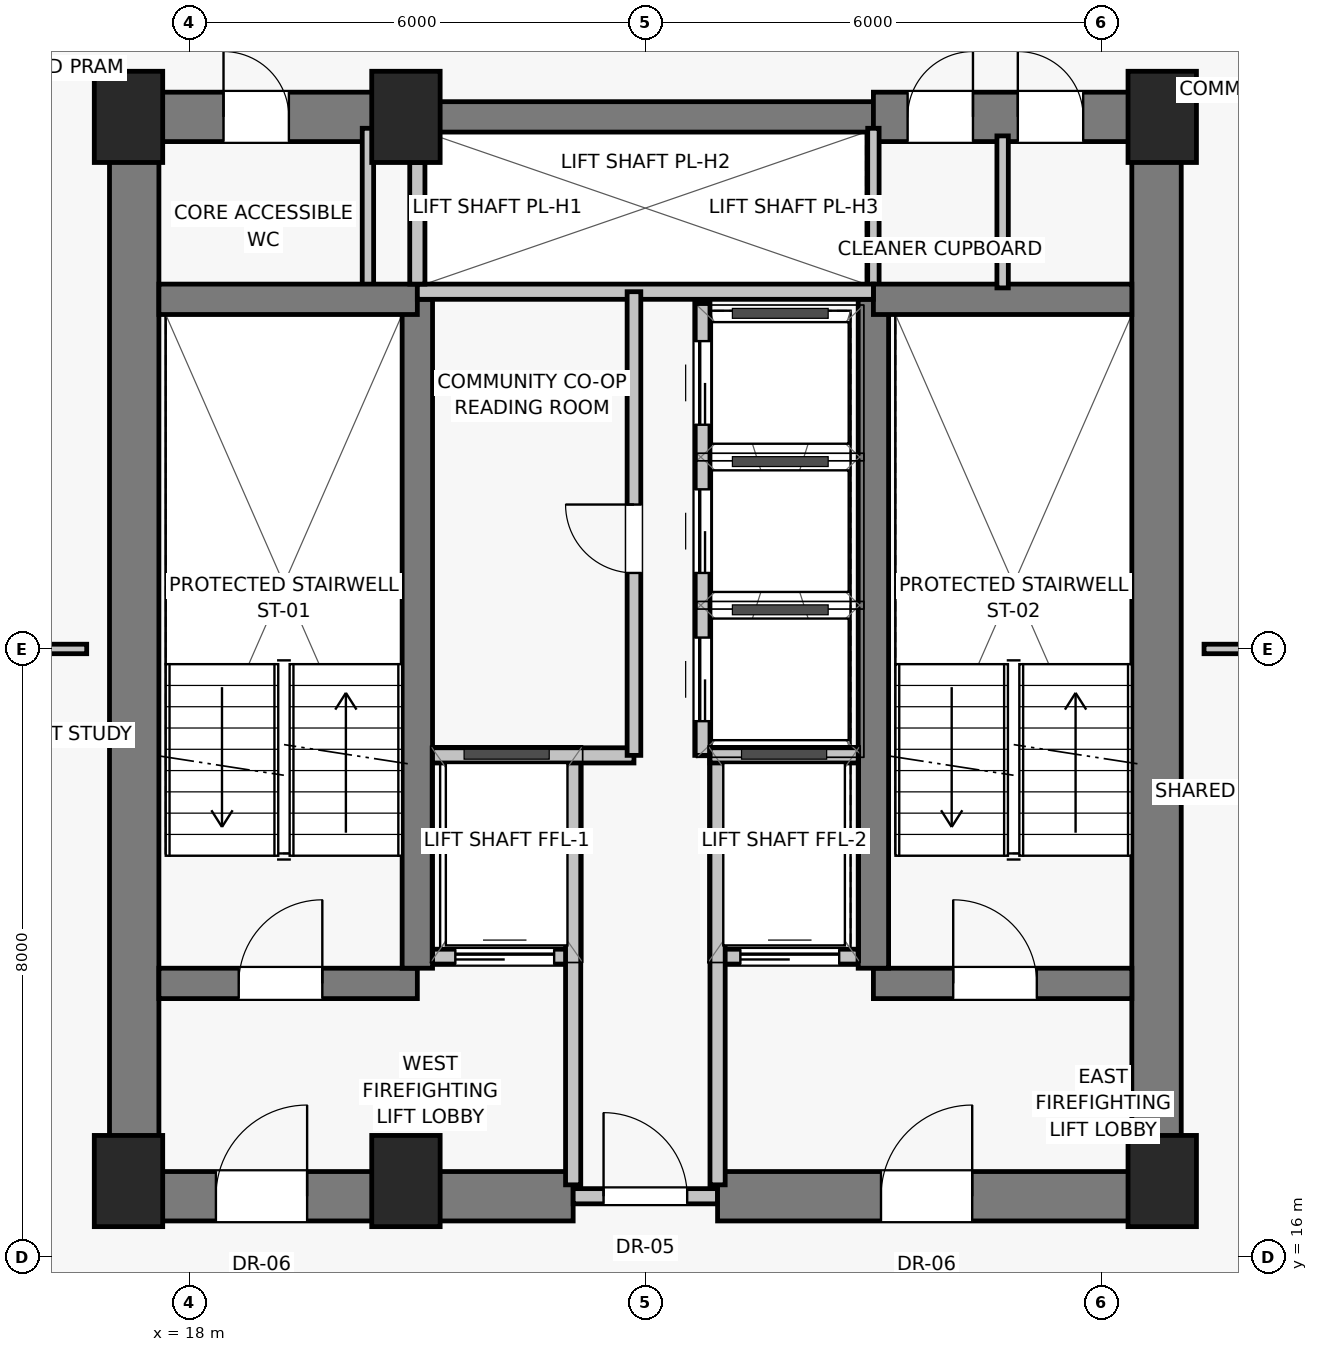
"""IFC4 building model, lengths in metres.
Left out: names, types, materials, properties, quantities, classifications, styles, units other than length and angle.
Written with IfcOpenShell. Run it as: python <this file> out.ifc"""

import sys

from ifc_helpers import new_model, si_unit, direction, frame, frame_2d, origin, origin_2d, place, context, subcontext, project, spatial, rectangle, extrude, source, transform, mapped, element, fill, save


model = new_model("IFC4")
c1 = context("Model", 3, precision=1e-05, world=origin(), true_north=direction((0.0, 1.0)))
c2 = subcontext(c1, "Body", "Model", "MODEL_VIEW")
j1 = project(units=[si_unit("LENGTHUNIT", "METRE"), si_unit("PLANEANGLEUNIT", "RADIAN")], contexts=[c1])
p1 = place(None, origin())
s1 = spatial("IfcSite", under=j1, at=p1, CompositionType="ELEMENT")
p2 = place(p1, origin())
s2 = spatial("IfcBuilding", under=s1, at=p2, CompositionType="ELEMENT")
p3 = place(p2, frame((0.0, 0.0, 139.25)))
s3 = spatial("IfcBuildingStorey", under=s2, at=p3, CompositionType="ELEMENT", Elevation=139.25)
for number, where, z_axis, x_axis in (
    (1, (17.2, 17.0, 0.0), (0.0, 0.0, 1.0), (1.0, 0.0, 0.0)),
    (2, (20.85, 17.0, 0.0), (0.0, 0.0, 1.0), (1.0, 0.0, 0.0)),
    (3, (30.8, 17.0, 0.0), (0.0, 0.0, 1.0), (1.0, 0.0, 0.0)),
    (4, (17.2, 31.0, 0.0), (0.0, 0.0, 1.0), (1.0, 0.0, 0.0)),
    (5, (20.85, 31.0, 0.0), (0.0, 0.0, 1.0), (1.0, 0.0, 0.0)),
    (6, (30.8, 31.0, 0.0), (0.0, 0.0, 1.0), (1.0, 0.0, 0.0)),
):
    element("IfcColumn", number, at=place(p3, frame(where, z_axis=z_axis, x_axis=x_axis)), inside=s3, PredefinedType="PILASTER", context=c2, shape_type="SweptSolid", body=[
        extrude(rectangle(XDim=0.9, YDim=1.2, at=origin_2d()), origin(), (0.0, 0.0, 1.0), 3.25),
    ])
for number, where, z_axis, x_axis in (
    (7, (17.275, 16.8, 0.0), (0.0, 0.0, 1.0), (0.0, 1.0, 0.0)),
    (8, (30.725, 16.8, 0.0), (0.0, 0.0, 1.0), (0.0, 1.0, 0.0)),
):
    element("IfcWall", number, at=place(p3, frame(where, z_axis=z_axis, x_axis=x_axis)), inside=s3, PredefinedType="SHEAR", context=c2, shape_type="SweptSolid", body=[
        extrude(rectangle(XDim=14.2, YDim=0.65, at=frame_2d((7.1, 0.0))), origin(), (0.0, 0.0, 1.0), 3.0),
    ])
p4 = place(p3, frame((17.2, 16.8, 0.0), z_axis=(0.0, 0.0, 1.0), x_axis=(1.0, 0.0, 0.0)))
e9 = element("IfcWall", 9, at=p4, inside=s3, PredefinedType="SHEAR", context=c2, shape_type="SweptSolid", body=[
    extrude(rectangle(XDim=5.85, YDim=0.65, at=frame_2d((2.925, 0.0))), origin(), (0.0, 0.0, 1.0), 3.0),
])
p5 = place(p4, frame((1.15, 0.0, 0.0)))
e10 = element("IfcOpeningElement", 10, at=p5, cuts=e9, PredefinedType="OPENING", context=c2, shape_type="SweptSolid", body=[
    extrude(rectangle(XDim=1.2, YDim=2.03, at=frame_2d((0.6, 1.015))), frame((0.0, 0.335, 0.0), z_axis=(0.0, -1.0, 0.0), x_axis=(1.0, 0.0, 0.0)), (0.0, 0.0, 1.0), 0.67),
])
p6 = place(p3, frame((23.05, 16.8, 0.0), z_axis=(0.0, 0.0, 1.0), x_axis=(1.0, 0.0, 0.0)))
e11 = element("IfcWall", 11, at=p6, inside=s3, PredefinedType="SOLIDWALL", context=c2, shape_type="SweptSolid", body=[
    extrude(rectangle(XDim=1.9, YDim=0.2, at=frame_2d((0.95, 0.0))), origin(), (0.0, 0.0, 1.0), 2.15),
])
p7 = place(p6, frame((0.4, 0.0, 0.0)))
e12 = element("IfcOpeningElement", 12, at=p7, cuts=e11, PredefinedType="OPENING", context=c2, shape_type="SweptSolid", body=[
    extrude(rectangle(XDim=1.1, YDim=2.03, at=frame_2d((0.55, 1.015))), frame((0.0, 0.11, 0.0), z_axis=(0.0, -1.0, 0.0), x_axis=(1.0, 0.0, 0.0)), (0.0, 0.0, 1.0), 0.22),
])
p8 = place(p3, frame((24.95, 16.8, 0.0), z_axis=(0.0, 0.0, 1.0), x_axis=(1.0, 0.0, 0.0)))
e13 = element("IfcWall", 13, at=p8, inside=s3, PredefinedType="SHEAR", context=c2, shape_type="SweptSolid", body=[
    extrude(rectangle(XDim=5.85, YDim=0.65, at=frame_2d((2.925, 0.0))), origin(), (0.0, 0.0, 1.0), 3.0),
])
p9 = place(p8, frame((2.15, 0.0, 0.0)))
e14 = element("IfcOpeningElement", 14, at=p9, cuts=e13, PredefinedType="OPENING", context=c2, shape_type="SweptSolid", body=[
    extrude(rectangle(XDim=1.2, YDim=2.03, at=frame_2d((0.6, 1.015))), frame((0.0, 0.335, 0.0), z_axis=(0.0, -1.0, 0.0), x_axis=(1.0, 0.0, 0.0)), (0.0, 0.0, 1.0), 0.67),
])
p10 = place(p3, frame((17.2, 31.0, 0.0), z_axis=(0.0, 0.0, 1.0), x_axis=(1.0, 0.0, 0.0)))
e15 = element("IfcWall", 15, at=p10, inside=s3, PredefinedType="SHEAR", context=c2, shape_type="SweptSolid", body=[
    extrude(rectangle(XDim=3.8, YDim=0.65, at=frame_2d((1.9, 0.0))), origin(), (0.0, 0.0, 1.0), 3.0),
])
p11 = place(p10, frame((1.25, 0.0, 0.0)))
e16 = element("IfcOpeningElement", 16, at=p11, cuts=e15, PredefinedType="OPENING", context=c2, shape_type="SweptSolid", body=[
    extrude(rectangle(XDim=0.86, YDim=2.01, at=frame_2d((0.43, 1.005))), frame((0.0, 0.335, 0.0), z_axis=(0.0, -1.0, 0.0), x_axis=(1.0, 0.0, 0.0)), (0.0, 0.0, 1.0), 0.67),
])
p12 = place(p3, frame((21.0, 31.0, 0.0), z_axis=(0.0, 0.0, 1.0), x_axis=(1.0, 0.0, 0.0)))
e17 = element("IfcWall", 17, at=p12, inside=s3, PredefinedType="SHEAR", context=c2, shape_type="SweptSolid", body=[
    extrude(rectangle(XDim=6.0, YDim=0.4, at=frame_2d((3.0, 0.0))), origin(), (0.0, 0.0, 1.0), 3.0),
])
p13 = place(p3, frame((27.0, 31.0, 0.0), z_axis=(0.0, 0.0, 1.0), x_axis=(1.0, 0.0, 0.0)))
e18 = element("IfcWall", 18, at=p13, inside=s3, PredefinedType="SHEAR", context=c2, shape_type="SweptSolid", body=[
    extrude(rectangle(XDim=3.8, YDim=0.65, at=frame_2d((1.9, 0.0))), origin(), (0.0, 0.0, 1.0), 3.0),
])
p14 = place(p13, frame((0.45, 0.0, 0.0)))
e19 = element("IfcOpeningElement", 19, at=p14, cuts=e18, PredefinedType="OPENING", context=c2, shape_type="SweptSolid", body=[
    extrude(rectangle(XDim=0.86, YDim=2.01, at=frame_2d((0.43, 1.005))), frame((0.0, 0.335, 0.0), z_axis=(0.0, -1.0, 0.0), x_axis=(1.0, 0.0, 0.0)), (0.0, 0.0, 1.0), 0.67),
])
p15 = place(p13, frame((1.9, 0.0, 0.0)))
e20 = element("IfcOpeningElement", 20, at=p15, cuts=e18, PredefinedType="OPENING", context=c2, shape_type="SweptSolid", body=[
    extrude(rectangle(XDim=0.86, YDim=2.01, at=frame_2d((0.43, 1.005))), frame((0.0, 0.335, 0.0), z_axis=(0.0, -1.0, 0.0), x_axis=(1.0, 0.0, 0.0)), (0.0, 0.0, 1.0), 0.67),
])
for number, where, z_axis, x_axis in (
    (21, (20.35, 28.65, 0.0), (0.0, 0.0, 1.0), (0.0, 1.0, 0.0)),
    (22, (27.0, 28.65, 0.0), (0.0, 0.0, 1.0), (0.0, 1.0, 0.0)),
):
    element("IfcWall", number, at=place(p3, frame(where, z_axis=z_axis, x_axis=x_axis)), inside=s3, PredefinedType="PARTITIONING", context=c2, shape_type="SweptSolid", body=[
        extrude(rectangle(XDim=2.2, YDim=0.15, at=frame_2d((1.1, 0.0))), origin(), (0.0, 0.0, 1.0), 3.0),
    ])
p16 = place(p3, frame((17.6, 19.6, 0.0), z_axis=(0.0, 0.0, 1.0), x_axis=(1.0, 0.0, 0.0)))
e23 = element("IfcWall", 23, at=p16, inside=s3, PredefinedType="SHEAR", context=c2, shape_type="SweptSolid", body=[
    extrude(rectangle(XDim=3.4, YDim=0.4, at=frame_2d((1.7, 0.0))), origin(), (0.0, 0.0, 1.0), 3.0),
])
p17 = place(p16, frame((1.05, 0.0, 0.0)))
e24 = element("IfcOpeningElement", 24, at=p17, cuts=e23, PredefinedType="OPENING", context=c2, shape_type="SweptSolid", body=[
    extrude(rectangle(XDim=1.1, YDim=2.03, at=frame_2d((0.55, 1.015))), frame((0.0, 0.21, 0.0), z_axis=(0.0, -1.0, 0.0), x_axis=(1.0, 0.0, 0.0)), (0.0, 0.0, 1.0), 0.42),
])
p18 = place(p3, frame((21.2, 19.95, 0.0), z_axis=(0.0, 0.0, 1.0), x_axis=(1.0, 0.0, 0.0)))
e25 = element("IfcWall", 25, at=p18, inside=s3, PredefinedType="SOLIDWALL", context=c2, shape_type="SweptSolid", body=[
    extrude(rectangle(XDim=1.85, YDim=0.2, at=frame_2d((0.925, 0.0))), origin(), (0.0, 0.0, 1.0), 3.0),
])
p19 = place(p18, frame((0.3, 0.0, 0.0)))
e26 = element("IfcOpeningElement", 26, at=p19, cuts=e25, PredefinedType="OPENING", context=c2, shape_type="SweptSolid", body=[
    extrude(rectangle(XDim=1.3, YDim=2.25, at=frame_2d((0.65, 1.125))), frame((0.0, 0.11, 0.0), z_axis=(0.0, -1.0, 0.0), x_axis=(1.0, 0.0, 0.0)), (0.0, 0.0, 1.0), 0.22),
])
p20 = place(p3, frame((24.95, 19.95, 0.0), z_axis=(0.0, 0.0, 1.0), x_axis=(1.0, 0.0, 0.0)))
e27 = element("IfcWall", 27, at=p20, inside=s3, PredefinedType="SOLIDWALL", context=c2, shape_type="SweptSolid", body=[
    extrude(rectangle(XDim=1.85, YDim=0.2, at=frame_2d((0.925, 0.0))), origin(), (0.0, 0.0, 1.0), 3.0),
])
p21 = place(p20, frame((0.3, 0.0, 0.0)))
e28 = element("IfcOpeningElement", 28, at=p21, cuts=e27, PredefinedType="OPENING", context=c2, shape_type="SweptSolid", body=[
    extrude(rectangle(XDim=1.3, YDim=2.25, at=frame_2d((0.65, 1.125))), frame((0.0, 0.11, 0.0), z_axis=(0.0, -1.0, 0.0), x_axis=(1.0, 0.0, 0.0)), (0.0, 0.0, 1.0), 0.22),
])
p22 = place(p3, frame((27.0, 19.6, 0.0), z_axis=(0.0, 0.0, 1.0), x_axis=(1.0, 0.0, 0.0)))
e29 = element("IfcWall", 29, at=p22, inside=s3, PredefinedType="SHEAR", context=c2, shape_type="SweptSolid", body=[
    extrude(rectangle(XDim=3.4, YDim=0.4, at=frame_2d((1.7, 0.0))), origin(), (0.0, 0.0, 1.0), 3.0),
])
p23 = place(p22, frame((1.05, 0.0, 0.0)))
e30 = element("IfcOpeningElement", 30, at=p23, cuts=e29, PredefinedType="OPENING", context=c2, shape_type="SweptSolid", body=[
    extrude(rectangle(XDim=1.1, YDim=2.03, at=frame_2d((0.55, 1.015))), frame((0.0, 0.21, 0.0), z_axis=(0.0, -1.0, 0.0), x_axis=(1.0, 0.0, 0.0)), (0.0, 0.0, 1.0), 0.42),
])
for number, where, z_axis, x_axis in (
    (31, (21.0, 19.8, 0.0), (0.0, 0.0, 1.0), (0.0, 1.0, 0.0)),
    (32, (27.0, 19.8, 0.0), (0.0, 0.0, 1.0), (0.0, 1.0, 0.0)),
):
    element("IfcWall", number, at=place(p3, frame(where, z_axis=z_axis, x_axis=x_axis)), inside=s3, PredefinedType="SHEAR", context=c2, shape_type="SweptSolid", body=[
        extrude(rectangle(XDim=8.8, YDim=0.4, at=frame_2d((4.4, 0.0))), origin(), (0.0, 0.0, 1.0), 3.0),
    ])
for number, where, z_axis, x_axis in (
    (33, (17.6, 28.6, 0.0), (0.0, 0.0, 1.0), (1.0, 0.0, 0.0)),
    (34, (27.0, 28.6, 0.0), (0.0, 0.0, 1.0), (1.0, 0.0, 0.0)),
):
    element("IfcWall", number, at=place(p3, frame(where, z_axis=z_axis, x_axis=x_axis)), inside=s3, PredefinedType="SHEAR", context=c2, shape_type="SweptSolid", body=[
        extrude(rectangle(XDim=3.4, YDim=0.4, at=frame_2d((1.7, 0.0))), origin(), (0.0, 0.0, 1.0), 3.0),
    ])
for number, where, z_axis, x_axis in (
    (35, (23.05, 16.95, 0.0), (0.0, 0.0, 1.0), (0.0, 1.0, 0.0)),
    (36, (24.95, 16.95, 0.0), (0.0, 0.0, 1.0), (0.0, 1.0, 0.0)),
):
    element("IfcWall", number, at=place(p3, frame(where, z_axis=z_axis, x_axis=x_axis)), inside=s3, PredefinedType="SOLIDWALL", context=c2, shape_type="SweptSolid", body=[
        extrude(rectangle(XDim=5.6, YDim=0.2, at=frame_2d((2.8, 0.0))), origin(), (0.0, 0.0, 1.0), 3.0),
    ])
p24 = place(p3, frame((21.2, 22.6, 0.0), z_axis=(0.0, 0.0, 1.0), x_axis=(1.0, 0.0, 0.0)))
e37 = element("IfcWall", 37, at=p24, inside=s3, PredefinedType="SOLIDWALL", context=c2, shape_type="SweptSolid", body=[
    extrude(rectangle(XDim=2.65, YDim=0.2, at=frame_2d((1.325, 0.0))), origin(), (0.0, 0.0, 1.0), 3.0),
])
p25 = place(p3, frame((24.85, 22.6, 0.0), z_axis=(0.0, 0.0, 1.0), x_axis=(1.0, 0.0, 0.0)))
e38 = element("IfcWall", 38, at=p25, inside=s3, PredefinedType="SOLIDWALL", context=c2, shape_type="SweptSolid", body=[
    extrude(rectangle(XDim=1.95, YDim=0.2, at=frame_2d((0.975, 0.0))), origin(), (0.0, 0.0, 1.0), 3.0),
])
p26 = place(p3, frame((21.0, 28.7, 0.0), z_axis=(0.0, 0.0, 1.0), x_axis=(1.0, 0.0, 0.0)))
e39 = element("IfcWall", 39, at=p26, inside=s3, PredefinedType="SOLIDWALL", context=c2, shape_type="SweptSolid", body=[
    extrude(rectangle(XDim=6.0, YDim=0.2, at=frame_2d((3.0, 0.0))), origin(), (0.0, 0.0, 1.0), 3.0),
])
p27 = place(p3, frame((21.0, 28.8, 0.0), z_axis=(0.0, 0.0, 1.0), x_axis=(0.0, 1.0, 0.0)))
e40 = element("IfcWall", 40, at=p27, inside=s3, PredefinedType="SOLIDWALL", context=c2, shape_type="SweptSolid", body=[
    extrude(rectangle(XDim=1.6, YDim=0.2, at=frame_2d((0.8, 0.0))), origin(), (0.0, 0.0, 1.0), 3.0),
])
p28 = place(p3, frame((23.85, 22.6, 0.0), z_axis=(0.0, 0.0, 1.0), x_axis=(0.0, 1.0, 0.0)))
e41 = element("IfcWall", 41, at=p28, inside=s3, PredefinedType="PARTITIONING", context=c2, shape_type="SweptSolid", body=[
    extrude(rectangle(XDim=6.1, YDim=0.18, at=frame_2d((3.05, 0.0))), origin(), (0.0, 0.0, 1.0), 3.0),
])
p29 = place(p28, frame((2.4, 0.0, 0.0)))
e42 = element("IfcOpeningElement", 42, at=p29, cuts=e41, PredefinedType="OPENING", context=c2, shape_type="SweptSolid", body=[
    extrude(rectangle(XDim=0.9, YDim=2.01, at=frame_2d((0.45, 1.005))), frame((0.0, 0.1, 0.0), z_axis=(0.0, -1.0, 0.0), x_axis=(1.0, 0.0, 0.0)), (0.0, 0.0, 1.0), 0.2),
])
p30 = place(p3, frame((24.75, 22.6, 0.0), z_axis=(0.0, 0.0, 1.0), x_axis=(0.0, 1.0, 0.0)))
e43 = element("IfcWall", 43, at=p30, inside=s3, PredefinedType="SOLIDWALL", context=c2, shape_type="SweptSolid", body=[
    extrude(rectangle(XDim=5.95, YDim=0.2, at=frame_2d((2.975, 0.0))), origin(), (0.0, 0.0, 1.0), 3.0),
])
p31 = place(p30, frame((0.45, 0.0, 0.0)))
e44 = element("IfcOpeningElement", 44, at=p31, cuts=e43, PredefinedType="OPENING", context=c2, shape_type="SweptSolid", body=[
    extrude(rectangle(XDim=1.1, YDim=2.08, at=frame_2d((0.55, 1.04))), frame((0.0, 0.11, 0.0), z_axis=(0.0, -1.0, 0.0), x_axis=(1.0, 0.0, 0.0)), (0.0, 0.0, 1.0), 0.22),
])
p32 = place(p30, frame((2.4, 0.0, 0.0)))
e45 = element("IfcOpeningElement", 45, at=p32, cuts=e43, PredefinedType="OPENING", context=c2, shape_type="SweptSolid", body=[
    extrude(rectangle(XDim=1.1, YDim=2.08, at=frame_2d((0.55, 1.04))), frame((0.0, 0.11, 0.0), z_axis=(0.0, -1.0, 0.0), x_axis=(1.0, 0.0, 0.0)), (0.0, 0.0, 1.0), 0.22),
])
p33 = place(p30, frame((4.35, 0.0, 0.0)))
e46 = element("IfcOpeningElement", 46, at=p33, cuts=e43, PredefinedType="OPENING", context=c2, shape_type="SweptSolid", body=[
    extrude(rectangle(XDim=1.1, YDim=2.08, at=frame_2d((0.55, 1.04))), frame((0.0, 0.11, 0.0), z_axis=(0.0, -1.0, 0.0), x_axis=(1.0, 0.0, 0.0)), (0.0, 0.0, 1.0), 0.22),
])
p34 = place(p3, frame((28.7, 28.75, 0.0), z_axis=(0.0, 0.0, 1.0), x_axis=(0.0, 1.0, 0.0)))
e47 = element("IfcWall", 47, at=p34, inside=s3, PredefinedType="PARTITIONING", context=c2, shape_type="SweptSolid", body=[
    extrude(rectangle(XDim=2.0, YDim=0.15, at=frame_2d((1.0, 0.0))), origin(), (0.0, 0.0, 1.0), 3.0),
])
for number, where, z_axis, x_axis in (
    (48, (14.55, 24.0, 0.0), (0.0, 0.0, 1.0), (1.0, 0.0, 0.0)),
    (49, (31.35, 24.0, 0.0), (0.0, 0.0, 1.0), (1.0, 0.0, 0.0)),
):
    element("IfcWall", number, at=place(p3, frame(where, z_axis=z_axis, x_axis=x_axis)), inside=s3, PredefinedType="PARTITIONING", context=c2, shape_type="SweptSolid", body=[
        extrude(rectangle(XDim=2.1, YDim=0.125, at=frame_2d((1.05, 0.0))), origin(), (0.0, 0.0, 1.0), 3.0),
    ])
m1 = source(origin(), c2, "Body", "SweptSolid", [
    extrude(rectangle(XDim=1.2, YDim=2.03, at=frame_2d((0.6, 1.015))), frame((0.0, 0.025, 0.0), z_axis=(0.0, -1.0, 0.0), x_axis=(1.0, 0.0, 0.0)), (0.0, 0.0, 1.0), 0.05),
])
p35 = place(p5, origin())
e50 = element("IfcDoor", 50, at=p35, inside=s3, OperationType="SINGLE_SWING_RIGHT", PredefinedType="DOOR", context=c2, shape_type="MappedRepresentation", body=[
    mapped(m1, transform((0.0, 0.0, 0.0), scale=1.0)),
])
fill(e10, e50)
m2 = source(origin(), c2, "Body", "SweptSolid", [
    extrude(rectangle(XDim=1.1, YDim=2.03, at=frame_2d((0.55, 1.015))), frame((0.0, 0.025, 0.0), z_axis=(0.0, -1.0, 0.0), x_axis=(1.0, 0.0, 0.0)), (0.0, 0.0, 1.0), 0.05),
])
p36 = place(p7, origin())
e51 = element("IfcDoor", 51, at=p36, inside=s3, OperationType="SINGLE_SWING_LEFT", PredefinedType="DOOR", context=c2, shape_type="MappedRepresentation", body=[
    mapped(m2, transform((0.0, 0.0, 0.0), scale=1.0)),
])
fill(e12, e51)
p37 = place(p9, origin())
e52 = element("IfcDoor", 52, at=p37, inside=s3, OperationType="SINGLE_SWING_RIGHT", PredefinedType="DOOR", context=c2, shape_type="MappedRepresentation", body=[
    mapped(m1, transform((0.0, 0.0, 0.0), scale=1.0)),
])
fill(e14, e52)
m3 = source(origin(), c2, "Body", "SweptSolid", [
    extrude(rectangle(XDim=0.86, YDim=2.01, at=frame_2d((0.43, 1.005))), frame((0.0, 0.025, 0.0), z_axis=(0.0, -1.0, 0.0), x_axis=(1.0, 0.0, 0.0)), (0.0, 0.0, 1.0), 0.05),
])
p38 = place(p11, origin())
e53 = element("IfcDoor", 53, at=p38, inside=s3, OperationType="SINGLE_SWING_LEFT", PredefinedType="DOOR", context=c2, shape_type="MappedRepresentation", body=[
    mapped(m3, transform((0.0, 0.0, 0.0), scale=1.0)),
])
fill(e16, e53)
p39 = place(p14, origin())
e54 = element("IfcDoor", 54, at=p39, inside=s3, OperationType="SINGLE_SWING_RIGHT", PredefinedType="DOOR", context=c2, shape_type="MappedRepresentation", body=[
    mapped(m3, transform((0.0, 0.0, 0.0), scale=1.0)),
])
fill(e19, e54)
p40 = place(p15, origin())
e55 = element("IfcDoor", 55, at=p40, inside=s3, OperationType="SINGLE_SWING_LEFT", PredefinedType="DOOR", context=c2, shape_type="MappedRepresentation", body=[
    mapped(m3, transform((0.0, 0.0, 0.0), scale=1.0)),
])
fill(e20, e55)
p41 = place(p17, origin())
e56 = element("IfcDoor", 56, at=p41, inside=s3, OperationType="SINGLE_SWING_RIGHT", PredefinedType="DOOR", context=c2, shape_type="MappedRepresentation", body=[
    mapped(m2, transform((0.0, 0.0, 0.0), scale=1.0)),
])
fill(e24, e56)
m4 = source(origin(), c2, "Body", "SweptSolid", [
    extrude(rectangle(XDim=1.3, YDim=2.25, at=frame_2d((0.65, 1.125))), frame((0.0, 0.025, 0.0), z_axis=(0.0, -1.0, 0.0), x_axis=(1.0, 0.0, 0.0)), (0.0, 0.0, 1.0), 0.05),
])
p42 = place(p19, origin())
e57 = element("IfcDoor", 57, at=p42, inside=s3, OperationType="SLIDING_TO_LEFT", PredefinedType="DOOR", context=c2, shape_type="MappedRepresentation", body=[
    mapped(m4, transform((0.0, 0.0, 0.0), scale=1.0)),
])
fill(e26, e57)
p43 = place(p21, origin())
e58 = element("IfcDoor", 58, at=p43, inside=s3, OperationType="SLIDING_TO_LEFT", PredefinedType="DOOR", context=c2, shape_type="MappedRepresentation", body=[
    mapped(m4, transform((0.0, 0.0, 0.0), scale=1.0)),
])
fill(e28, e58)
p44 = place(p23, origin())
e59 = element("IfcDoor", 59, at=p44, inside=s3, OperationType="SINGLE_SWING_LEFT", PredefinedType="DOOR", context=c2, shape_type="MappedRepresentation", body=[
    mapped(m2, transform((0.0, 0.0, 0.0), scale=1.0)),
])
fill(e30, e59)
m5 = source(origin(), c2, "Body", "SweptSolid", [
    extrude(rectangle(XDim=0.9, YDim=2.01, at=frame_2d((0.45, 1.005))), frame((0.0, 0.025, 0.0), z_axis=(0.0, -1.0, 0.0), x_axis=(1.0, 0.0, 0.0)), (0.0, 0.0, 1.0), 0.05),
])
p45 = place(p29, origin())
e60 = element("IfcDoor", 60, at=p45, inside=s3, OperationType="SINGLE_SWING_RIGHT", PredefinedType="DOOR", context=c2, shape_type="MappedRepresentation", body=[
    mapped(m5, transform((0.0, 0.0, 0.0), scale=1.0)),
])
fill(e42, e60)
m6 = source(origin(), c2, "Body", "SweptSolid", [
    extrude(rectangle(XDim=1.1, YDim=2.08, at=frame_2d((0.55, 1.04))), frame((0.0, 0.025, 0.0), z_axis=(0.0, -1.0, 0.0), x_axis=(1.0, 0.0, 0.0)), (0.0, 0.0, 1.0), 0.05),
])
p46 = place(p31, origin())
e61 = element("IfcDoor", 61, at=p46, inside=s3, OperationType="SLIDING_TO_LEFT", PredefinedType="DOOR", context=c2, shape_type="MappedRepresentation", body=[
    mapped(m6, transform((0.0, 0.0, 0.0), scale=1.0)),
])
fill(e44, e61)
p47 = place(p32, origin())
e62 = element("IfcDoor", 62, at=p47, inside=s3, OperationType="SLIDING_TO_LEFT", PredefinedType="DOOR", context=c2, shape_type="MappedRepresentation", body=[
    mapped(m6, transform((0.0, 0.0, 0.0), scale=1.0)),
])
fill(e45, e62)
p48 = place(p33, origin())
e63 = element("IfcDoor", 63, at=p48, inside=s3, OperationType="SLIDING_TO_LEFT", PredefinedType="DOOR", context=c2, shape_type="MappedRepresentation", body=[
    mapped(m6, transform((0.0, 0.0, 0.0), scale=1.0)),
])
fill(e46, e63)
save(model, sys.argv[1])
